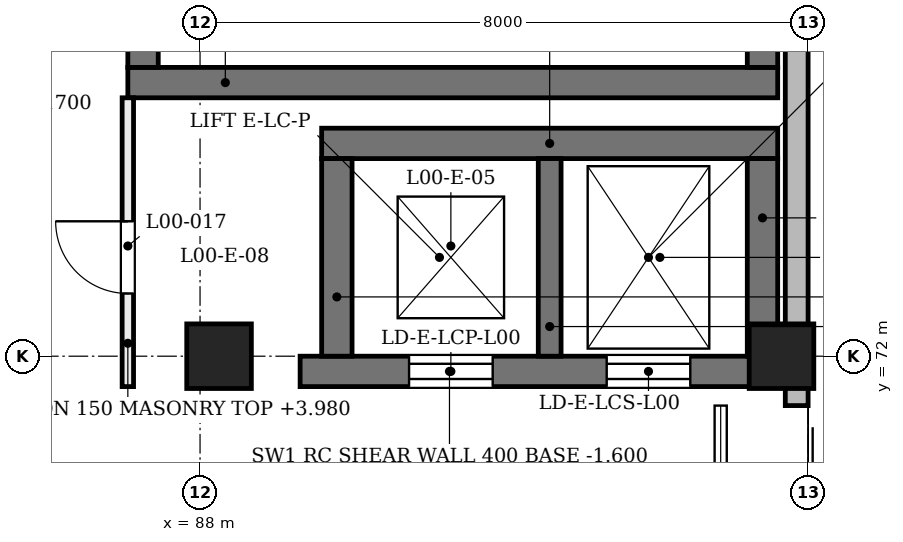
"""IFC4 building model, lengths in metres.
Left out: names, types, materials, properties, quantities, classifications, styles, units other than length and angle.
Written with IfcOpenShell. Run it as: python <this file> out.ifc"""

import sys

from ifc_helpers import new_model, si_unit, direction, frame, frame_2d, origin, origin_2d, place, context, subcontext, project, spatial, rectangle, extrude, element, fill, save


model = new_model("IFC4")
c1 = context("Model", 3, precision=1e-05, world=origin(), true_north=direction((0.0, 1.0)))
c2 = subcontext(c1, "Body", "Model", "MODEL_VIEW")
j1 = project(units=[si_unit("LENGTHUNIT", "METRE"), si_unit("PLANEANGLEUNIT", "RADIAN")], contexts=[c1])
p1 = place(None, origin())
s1 = spatial("IfcSite", under=j1, at=p1, CompositionType="ELEMENT")
p2 = place(p1, origin())
s2 = spatial("IfcBuilding", under=s1, at=p2, CompositionType="ELEMENT")
p3 = place(p2, origin())
s3 = spatial("IfcBuildingStorey", under=s2, at=p3, CompositionType="ELEMENT", Elevation=0.0)
p4 = place(p3, frame((89.317, 71.8, -1.6), z_axis=(0.0, 0.0, 1.0), x_axis=(1.0, 0.0, 0.0)))
e1 = element("IfcWall", 1, at=p4, inside=s3, PredefinedType="SHEAR", context=c2, shape_type="SweptSolid", body=[
    extrude(rectangle(XDim=6.55, YDim=0.4, at=frame_2d((3.275, 0.0))), origin(), (0.0, 0.0, 1.0), 6.18),
])
p5 = place(p4, frame((1.433, 0.0, 1.6)))
e2 = element("IfcOpeningElement", 2, at=p5, cuts=e1, PredefinedType="OPENING", context=c2, shape_type="SweptSolid", body=[
    extrude(rectangle(XDim=1.1, YDim=2.1, at=frame_2d((0.55, 1.05))), frame((0.0, 0.21, 0.0), z_axis=(0.0, -1.0, 0.0), x_axis=(1.0, 0.0, 0.0)), (0.0, 0.0, 1.0), 0.42),
])
p6 = place(p4, frame((4.033, 0.0, 1.6)))
e3 = element("IfcOpeningElement", 3, at=p6, cuts=e1, PredefinedType="OPENING", context=c2, shape_type="SweptSolid", body=[
    extrude(rectangle(XDim=1.1, YDim=2.1, at=frame_2d((0.55, 1.05))), frame((0.0, 0.21, 0.0), z_axis=(0.0, -1.0, 0.0), x_axis=(1.0, 0.0, 0.0)), (0.0, 0.0, 1.0), 0.42),
])
p7 = place(p3, frame((89.6, 74.8, -1.6), z_axis=(0.0, 0.0, 1.0), x_axis=(1.0, 0.0, 0.0)))
e4 = element("IfcWall", 4, at=p7, inside=s3, PredefinedType="SHEAR", context=c2, shape_type="SweptSolid", body=[
    extrude(rectangle(XDim=6.0, YDim=0.4, at=frame_2d((3.0, 0.0))), origin(), (0.0, 0.0, 1.0), 6.18),
])
for number, where, z_axis, x_axis in (
    (5, (89.8, 72.0, -1.6), (0.0, 0.0, 1.0), (0.0, 1.0, 0.0)),
    (6, (95.4, 72.0, -1.6), (0.0, 0.0, 1.0), (0.0, 1.0, 0.0)),
):
    element("IfcWall", number, at=place(p3, frame(where, z_axis=z_axis, x_axis=x_axis)), inside=s3, PredefinedType="SHEAR", context=c2, shape_type="SweptSolid", body=[
        extrude(rectangle(XDim=2.6, YDim=0.4, at=frame_2d((1.3, 0.0))), origin(), (0.0, 0.0, 1.0), 6.18),
    ])
p8 = place(p3, frame((92.6, 72.0, -1.6), z_axis=(0.0, 0.0, 1.0), x_axis=(0.0, 1.0, 0.0)))
e7 = element("IfcWall", 7, at=p8, inside=s3, PredefinedType="SHEAR", context=c2, shape_type="SweptSolid", body=[
    extrude(rectangle(XDim=2.6, YDim=0.3, at=frame_2d((1.3, 0.0))), origin(), (0.0, 0.0, 1.0), 6.18),
])
p9 = place(p3, frame((87.05, 75.6, -1.6), z_axis=(0.0, 0.0, 1.0), x_axis=(1.0, 0.0, 0.0)))
e8 = element("IfcWall", 8, at=p9, inside=s3, PredefinedType="SHEAR", context=c2, shape_type="SweptSolid", body=[
    extrude(rectangle(XDim=8.55, YDim=0.4, at=frame_2d((4.275, 0.0))), origin(), (0.0, 0.0, 1.0), 6.18),
])
p10 = place(p3, frame((87.25, 75.8, -1.6), z_axis=(0.0, 0.0, 1.0), x_axis=(0.0, 1.0, 0.0)))
e9 = element("IfcWall", 9, at=p10, inside=s3, PredefinedType="SHEAR", context=c2, shape_type="SweptSolid", body=[
    extrude(rectangle(XDim=15.6, YDim=0.4, at=frame_2d((7.8, 0.0))), origin(), (0.0, 0.0, 1.0), 6.18),
])
p11 = place(p10, frame((6.987, 0.0, 1.6)))
e10 = element("IfcOpeningElement", 10, at=p11, cuts=e9, PredefinedType="OPENING", context=c2, shape_type="SweptSolid", body=[
    extrude(rectangle(XDim=1.4, YDim=2.4, at=frame_2d((0.7, 1.2))), frame((0.0, 0.21, 0.0), z_axis=(0.0, -1.0, 0.0), x_axis=(1.0, 0.0, 0.0)), (0.0, 0.0, 1.0), 0.42),
])
p12 = place(p3, frame((95.4, 75.8, -1.6), z_axis=(0.0, 0.0, 1.0), x_axis=(0.0, 1.0, 0.0)))
e11 = element("IfcWall", 11, at=p12, inside=s3, PredefinedType="SHEAR", context=c2, shape_type="SweptSolid", body=[
    extrude(rectangle(XDim=15.6, YDim=0.4, at=frame_2d((7.8, 0.0))), origin(), (0.0, 0.0, 1.0), 6.18),
])
for number, where, z_axis, x_axis in (
    (12, (87.667, 72.0, -1.6), (0.204, 0.0, 0.979), (0.0, 1.0, 0.0)),
    (13, (95.067, 72.0, -1.6), (0.204, 0.0, 0.979), (0.0, 1.0, 0.0)),
):
    element("IfcColumn", number, at=place(p3, frame(where, z_axis=z_axis, x_axis=x_axis)), inside=s3, PredefinedType="COLUMN", context=c2, shape_type="SweptSolid", body=[
        extrude(rectangle(XDim=0.85, YDim=0.85, at=origin_2d()), origin(), (0.0, 0.0, 1.0), 6.538),
    ])
p13 = place(p3, frame((95.85, 71.35, 0.0), z_axis=(0.0, 0.0, 1.0), x_axis=(0.0, 1.0, 0.0)))
e14 = element("IfcWall", 14, at=p13, inside=s3, PredefinedType="SOLIDWALL", context=c2, shape_type="SweptSolid", body=[
    extrude(rectangle(XDim=20.7, YDim=0.3, at=frame_2d((10.35, 0.0))), origin(), (0.0, 0.0, 1.0), 3.9),
])
p14 = place(p3, frame((87.05, 71.6, 0.0), z_axis=(0.0, 0.0, 1.0), x_axis=(0.0, 1.0, 0.0)))
e15 = element("IfcWall", 15, at=p14, inside=s3, PredefinedType="PARTITIONING", context=c2, shape_type="SweptSolid", body=[
    extrude(rectangle(XDim=3.8, YDim=0.15, at=frame_2d((1.9, 0.0))), origin(), (0.0, 0.0, 1.0), 3.98),
])
p15 = place(p14, frame((1.225, 0.0, 0.0)))
e16 = element("IfcOpeningElement", 16, at=p15, cuts=e15, PredefinedType="OPENING", context=c2, shape_type="SweptSolid", body=[
    extrude(rectangle(XDim=0.95, YDim=2.1, at=frame_2d((0.475, 1.05))), frame((0.0, 0.085, 0.0), z_axis=(0.0, -1.0, 0.0), x_axis=(1.0, 0.0, 0.0)), (0.0, 0.0, 1.0), 0.17),
])
p16 = place(p5, frame((1.1, 0.0, 0.0), z_axis=(0.0, 0.0, 1.0), x_axis=(-1.0, 0.0, 0.0)))
e17 = element("IfcDoor", 17, at=p16, inside=s3, OperationType="DOUBLE_DOOR_SLIDING", PredefinedType="DOOR", context=c2, shape_type="SweptSolid", body=[
    extrude(rectangle(XDim=1.1, YDim=2.1, at=frame_2d((0.55, 1.05))), frame((0.0, 0.025, 0.0), z_axis=(0.0, -1.0, 0.0), x_axis=(1.0, 0.0, 0.0)), (0.0, 0.0, 1.0), 0.05),
])
fill(e2, e17)
p17 = place(p6, frame((1.1, 0.0, 0.0), z_axis=(0.0, 0.0, 1.0), x_axis=(-1.0, 0.0, 0.0)))
e18 = element("IfcDoor", 18, at=p17, inside=s3, OperationType="DOUBLE_DOOR_SLIDING", PredefinedType="DOOR", context=c2, shape_type="SweptSolid", body=[
    extrude(rectangle(XDim=1.1, YDim=2.1, at=frame_2d((0.55, 1.05))), frame((0.0, 0.025, 0.0), z_axis=(0.0, -1.0, 0.0), x_axis=(1.0, 0.0, 0.0)), (0.0, 0.0, 1.0), 0.05),
])
fill(e3, e18)
p18 = place(p15, frame((0.95, 0.0, 0.0), z_axis=(0.0, 0.0, 1.0), x_axis=(-1.0, 0.0, 0.0)))
e19 = element("IfcDoor", 19, at=p18, inside=s3, OperationType="SINGLE_SWING_RIGHT", PredefinedType="DOOR", context=c2, shape_type="SweptSolid", body=[
    extrude(rectangle(XDim=0.95, YDim=2.1, at=frame_2d((0.475, 1.05))), frame((0.0, 0.025, 0.0), z_axis=(0.0, -1.0, 0.0), x_axis=(1.0, 0.0, 0.0)), (0.0, 0.0, 1.0), 0.05),
])
fill(e16, e19)
save(model, sys.argv[1])
